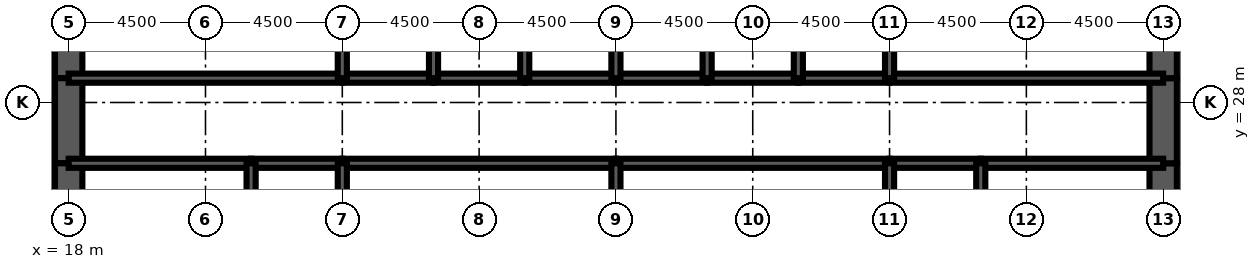
"""IFC4 building model, lengths in metres.
Left out: names, types, materials, properties, quantities, classifications, styles, units other than length and angle.
Written with IfcOpenShell. Run it as: python <this file> out.ifc"""

import sys

from ifc_helpers import new_model, si_unit, direction, frame, frame_2d, origin, place, context, subcontext, project, spatial, rectangle, extrude, element, fill, save


model = new_model("IFC4")
c1 = context("Model", 3, precision=1e-05, world=origin(), true_north=direction((0.0, 1.0)))
c2 = subcontext(c1, "Body", "Model", "MODEL_VIEW")
j1 = project(units=[si_unit("LENGTHUNIT", "METRE"), si_unit("PLANEANGLEUNIT", "RADIAN")], contexts=[c1])
p1 = place(None, origin())
s1 = spatial("IfcSite", under=j1, at=p1, CompositionType="ELEMENT")
p2 = place(p1, origin())
s2 = spatial("IfcBuilding", under=s1, at=p2, CompositionType="ELEMENT")
p3 = place(p2, frame((0.0, 0.0, 41.0)))
s3 = spatial("IfcBuildingStorey", under=s2, at=p3, CompositionType="ELEMENT", Elevation=41.0)
p4 = place(p3, frame((18.0, 32.0, 0.0), z_axis=(0.0, 0.0, 1.0), x_axis=(0.0, -1.0, 0.0)))
e1 = element("IfcWall", 1, at=p4, inside=s3, PredefinedType="SHEAR", context=c2, shape_type="SweptSolid", body=[
    extrude(rectangle(XDim=3.2, YDim=0.9, at=frame_2d((1.6, 0.0))), origin(), (0.0, 0.0, 1.0), 4.5),
])
p5 = place(p3, frame((18.0, 28.8, 0.0), z_axis=(0.0, 0.0, 1.0), x_axis=(0.0, -1.0, 0.0)))
e2 = element("IfcWall", 2, at=p5, inside=s3, PredefinedType="SHEAR", context=c2, shape_type="SweptSolid", body=[
    extrude(rectangle(XDim=2.8, YDim=0.9, at=frame_2d((1.4, 0.0))), origin(), (0.0, 0.0, 1.0), 4.5),
])
p6 = place(p5, frame((0.4, 0.0, 0.0)))
e3 = element("IfcOpeningElement", 3, at=p6, cuts=e2, PredefinedType="OPENING", context=c2, shape_type="SweptSolid", body=[
    extrude(rectangle(XDim=1.8, YDim=2.1, at=frame_2d((0.9, 1.05))), frame((0.0, 0.46, 0.0), z_axis=(0.0, -1.0, 0.0), x_axis=(1.0, 0.0, 0.0)), (0.0, 0.0, 1.0), 0.92),
])
for number, where, z_axis, x_axis in (
    (4, (18.0, 26.0, 0.0), (0.0, 0.0, 1.0), (0.0, -1.0, 0.0)),
    (5, (54.0, 22.0, 0.0), (0.0, 0.0, 1.0), (0.0, 1.0, 0.0)),
):
    element("IfcWall", number, at=place(p3, frame(where, z_axis=z_axis, x_axis=x_axis)), inside=s3, PredefinedType="SHEAR", context=c2, shape_type="SweptSolid", body=[
        extrude(rectangle(XDim=4.0, YDim=0.9, at=frame_2d((2.0, 0.0))), origin(), (0.0, 0.0, 1.0), 4.5),
    ])
p7 = place(p3, frame((54.0, 26.0, 0.0), z_axis=(0.0, 0.0, 1.0), x_axis=(0.0, 1.0, 0.0)))
e6 = element("IfcWall", 6, at=p7, inside=s3, PredefinedType="SHEAR", context=c2, shape_type="SweptSolid", body=[
    extrude(rectangle(XDim=2.8, YDim=0.9, at=frame_2d((1.4, 0.0))), origin(), (0.0, 0.0, 1.0), 4.5),
])
p8 = place(p7, frame((0.6, 0.0, 0.0)))
e7 = element("IfcOpeningElement", 7, at=p8, cuts=e6, PredefinedType="OPENING", context=c2, shape_type="SweptSolid", body=[
    extrude(rectangle(XDim=1.8, YDim=2.1, at=frame_2d((0.9, 1.05))), frame((0.0, 0.46, 0.0), z_axis=(0.0, -1.0, 0.0), x_axis=(1.0, 0.0, 0.0)), (0.0, 0.0, 1.0), 0.92),
])
p9 = place(p3, frame((54.0, 28.8, 0.0), z_axis=(0.0, 0.0, 1.0), x_axis=(0.0, 1.0, 0.0)))
e8 = element("IfcWall", 8, at=p9, inside=s3, PredefinedType="SHEAR", context=c2, shape_type="SweptSolid", body=[
    extrude(rectangle(XDim=3.2, YDim=0.9, at=frame_2d((1.6, 0.0))), origin(), (0.0, 0.0, 1.0), 4.5),
])
p10 = place(p3, frame((18.0, 28.8, 0.0), z_axis=(0.0, 0.0, 1.0), x_axis=(1.0, 0.0, 0.0)))
e9 = element("IfcWall", 9, at=p10, inside=s3, PredefinedType="SOLIDWALL", context=c2, shape_type="SweptSolid", body=[
    extrude(rectangle(XDim=9.0, YDim=0.3, at=frame_2d((4.5, 0.0))), origin(), (0.0, 0.0, 1.0), 4.5),
])
p11 = place(p10, frame((0.65, 0.0, 0.0)))
e10 = element("IfcOpeningElement", 10, at=p11, cuts=e9, PredefinedType="OPENING", context=c2, shape_type="SweptSolid", body=[
    extrude(rectangle(XDim=1.0, YDim=2.1, at=frame_2d((0.5, 1.05))), frame((0.0, 0.16, 0.0), z_axis=(0.0, -1.0, 0.0), x_axis=(1.0, 0.0, 0.0)), (0.0, 0.0, 1.0), 0.32),
])
p12 = place(p3, frame((27.0, 28.8, 0.0), z_axis=(0.0, 0.0, 1.0), x_axis=(1.0, 0.0, 0.0)))
e11 = element("IfcWall", 11, at=p12, inside=s3, PredefinedType="SOLIDWALL", context=c2, shape_type="SweptSolid", body=[
    extrude(rectangle(XDim=3.0, YDim=0.3, at=frame_2d((1.5, 0.0))), origin(), (0.0, 0.0, 1.0), 4.5),
])
p13 = place(p12, frame((0.95, 0.0, 0.0)))
e12 = element("IfcOpeningElement", 12, at=p13, cuts=e11, PredefinedType="OPENING", context=c2, shape_type="SweptSolid", body=[
    extrude(rectangle(XDim=1.1, YDim=2.2, at=frame_2d((0.55, 1.1))), frame((0.0, 0.16, 0.0), z_axis=(0.0, -1.0, 0.0), x_axis=(1.0, 0.0, 0.0)), (0.0, 0.0, 1.0), 0.32),
])
p14 = place(p3, frame((30.0, 28.8, 0.0), z_axis=(0.0, 0.0, 1.0), x_axis=(1.0, 0.0, 0.0)))
e13 = element("IfcWall", 13, at=p14, inside=s3, PredefinedType="SOLIDWALL", context=c2, shape_type="SweptSolid", body=[
    extrude(rectangle(XDim=3.0, YDim=0.3, at=frame_2d((1.5, 0.0))), origin(), (0.0, 0.0, 1.0), 4.5),
])
p15 = place(p14, frame((0.95, 0.0, 0.0)))
e14 = element("IfcOpeningElement", 14, at=p15, cuts=e13, PredefinedType="OPENING", context=c2, shape_type="SweptSolid", body=[
    extrude(rectangle(XDim=1.1, YDim=2.2, at=frame_2d((0.55, 1.1))), frame((0.0, 0.16, 0.0), z_axis=(0.0, -1.0, 0.0), x_axis=(1.0, 0.0, 0.0)), (0.0, 0.0, 1.0), 0.32),
])
p16 = place(p3, frame((33.0, 28.8, 0.0), z_axis=(0.0, 0.0, 1.0), x_axis=(1.0, 0.0, 0.0)))
e15 = element("IfcWall", 15, at=p16, inside=s3, PredefinedType="SOLIDWALL", context=c2, shape_type="SweptSolid", body=[
    extrude(rectangle(XDim=3.0, YDim=0.3, at=frame_2d((1.5, 0.0))), origin(), (0.0, 0.0, 1.0), 4.5),
])
p17 = place(p16, frame((0.95, 0.0, 0.0)))
e16 = element("IfcOpeningElement", 16, at=p17, cuts=e15, PredefinedType="OPENING", context=c2, shape_type="SweptSolid", body=[
    extrude(rectangle(XDim=1.1, YDim=2.2, at=frame_2d((0.55, 1.1))), frame((0.0, 0.16, 0.0), z_axis=(0.0, -1.0, 0.0), x_axis=(1.0, 0.0, 0.0)), (0.0, 0.0, 1.0), 0.32),
])
for number, where, z_axis, x_axis in (
    (17, (36.0, 28.8, 0.0), (0.0, 0.0, 1.0), (1.0, 0.0, 0.0)),
    (18, (39.0, 28.8, 0.0), (0.0, 0.0, 1.0), (1.0, 0.0, 0.0)),
):
    element("IfcWall", number, at=place(p3, frame(where, z_axis=z_axis, x_axis=x_axis)), inside=s3, PredefinedType="SOLIDWALL", context=c2, shape_type="SweptSolid", body=[
        extrude(rectangle(XDim=3.0, YDim=0.3, at=frame_2d((1.5, 0.0))), origin(), (0.0, 0.0, 1.0), 4.5),
    ])
p18 = place(p3, frame((42.0, 28.8, 0.0), z_axis=(0.0, 0.0, 1.0), x_axis=(1.0, 0.0, 0.0)))
e19 = element("IfcWall", 19, at=p18, inside=s3, PredefinedType="SOLIDWALL", context=c2, shape_type="SweptSolid", body=[
    extrude(rectangle(XDim=3.0, YDim=0.3, at=frame_2d((1.5, 0.0))), origin(), (0.0, 0.0, 1.0), 4.5),
])
p19 = place(p18, frame((0.95, 0.0, 0.0)))
e20 = element("IfcOpeningElement", 20, at=p19, cuts=e19, PredefinedType="OPENING", context=c2, shape_type="SweptSolid", body=[
    extrude(rectangle(XDim=1.1, YDim=2.2, at=frame_2d((0.55, 1.1))), frame((0.0, 0.16, 0.0), z_axis=(0.0, -1.0, 0.0), x_axis=(1.0, 0.0, 0.0)), (0.0, 0.0, 1.0), 0.32),
])
p20 = place(p3, frame((45.0, 28.8, 0.0), z_axis=(0.0, 0.0, 1.0), x_axis=(1.0, 0.0, 0.0)))
e21 = element("IfcWall", 21, at=p20, inside=s3, PredefinedType="SOLIDWALL", context=c2, shape_type="SweptSolid", body=[
    extrude(rectangle(XDim=9.0, YDim=0.3, at=frame_2d((4.5, 0.0))), origin(), (0.0, 0.0, 1.0), 4.5),
])
p21 = place(p20, frame((7.35, 0.0, 0.0)))
e22 = element("IfcOpeningElement", 22, at=p21, cuts=e21, PredefinedType="OPENING", context=c2, shape_type="SweptSolid", body=[
    extrude(rectangle(XDim=1.0, YDim=2.1, at=frame_2d((0.5, 1.05))), frame((0.0, 0.16, 0.0), z_axis=(0.0, -1.0, 0.0), x_axis=(1.0, 0.0, 0.0)), (0.0, 0.0, 1.0), 0.32),
])
p22 = place(p3, frame((18.0, 26.0, 0.0), z_axis=(0.0, 0.0, 1.0), x_axis=(1.0, 0.0, 0.0)))
e23 = element("IfcWall", 23, at=p22, inside=s3, PredefinedType="SOLIDWALL", context=c2, shape_type="SweptSolid", body=[
    extrude(rectangle(XDim=6.0, YDim=0.3, at=frame_2d((3.0, 0.0))), origin(), (0.0, 0.0, 1.0), 4.5),
])
p23 = place(p3, frame((24.0, 26.0, 0.0), z_axis=(0.0, 0.0, 1.0), x_axis=(1.0, 0.0, 0.0)))
e24 = element("IfcWall", 24, at=p23, inside=s3, PredefinedType="SOLIDWALL", context=c2, shape_type="SweptSolid", body=[
    extrude(rectangle(XDim=3.0, YDim=0.3, at=frame_2d((1.5, 0.0))), origin(), (0.0, 0.0, 1.0), 4.5),
])
for number, where, z_axis, x_axis in (
    (25, (27.0, 26.0, 0.0), (0.0, 0.0, 1.0), (1.0, 0.0, 0.0)),
    (26, (36.0, 26.0, 0.0), (0.0, 0.0, 1.0), (1.0, 0.0, 0.0)),
):
    element("IfcWall", number, at=place(p3, frame(where, z_axis=z_axis, x_axis=x_axis)), inside=s3, PredefinedType="SOLIDWALL", context=c2, shape_type="SweptSolid", body=[
        extrude(rectangle(XDim=9.0, YDim=0.3, at=frame_2d((4.5, 0.0))), origin(), (0.0, 0.0, 1.0), 4.5),
    ])
p24 = place(p3, frame((45.0, 26.0, 0.0), z_axis=(0.0, 0.0, 1.0), x_axis=(1.0, 0.0, 0.0)))
e27 = element("IfcWall", 27, at=p24, inside=s3, PredefinedType="SOLIDWALL", context=c2, shape_type="SweptSolid", body=[
    extrude(rectangle(XDim=3.0, YDim=0.3, at=frame_2d((1.5, 0.0))), origin(), (0.0, 0.0, 1.0), 4.5),
])
p25 = place(p3, frame((48.0, 26.0, 0.0), z_axis=(0.0, 0.0, 1.0), x_axis=(1.0, 0.0, 0.0)))
e28 = element("IfcWall", 28, at=p25, inside=s3, PredefinedType="SOLIDWALL", context=c2, shape_type="SweptSolid", body=[
    extrude(rectangle(XDim=6.0, YDim=0.3, at=frame_2d((3.0, 0.0))), origin(), (0.0, 0.0, 1.0), 4.5),
])
for number, where, z_axis, x_axis in (
    (29, (27.0, 28.8, 0.0), (0.0, 0.0, 1.0), (0.0, 1.0, 0.0)),
    (30, (30.0, 28.8, 0.0), (0.0, 0.0, 1.0), (0.0, 1.0, 0.0)),
    (31, (33.0, 28.8, 0.0), (0.0, 0.0, 1.0), (0.0, 1.0, 0.0)),
    (32, (36.0, 28.8, 0.0), (0.0, 0.0, 1.0), (0.0, 1.0, 0.0)),
    (33, (39.0, 28.8, 0.0), (0.0, 0.0, 1.0), (0.0, 1.0, 0.0)),
    (34, (42.0, 28.8, 0.0), (0.0, 0.0, 1.0), (0.0, 1.0, 0.0)),
    (35, (45.0, 28.8, 0.0), (0.0, 0.0, 1.0), (0.0, 1.0, 0.0)),
):
    element("IfcWall", number, at=place(p3, frame(where, z_axis=z_axis, x_axis=x_axis)), inside=s3, PredefinedType="SOLIDWALL", context=c2, shape_type="SweptSolid", body=[
        extrude(rectangle(XDim=3.2, YDim=0.3, at=frame_2d((1.6, 0.0))), origin(), (0.0, 0.0, 1.0), 4.5),
    ])
for number, where, z_axis, x_axis in (
    (36, (24.0, 22.0, 0.0), (0.0, 0.0, 1.0), (0.0, 1.0, 0.0)),
    (37, (27.0, 22.0, 0.0), (0.0, 0.0, 1.0), (0.0, 1.0, 0.0)),
    (38, (36.0, 22.0, 0.0), (0.0, 0.0, 1.0), (0.0, 1.0, 0.0)),
    (39, (45.0, 22.0, 0.0), (0.0, 0.0, 1.0), (0.0, 1.0, 0.0)),
    (40, (48.0, 22.0, 0.0), (0.0, 0.0, 1.0), (0.0, 1.0, 0.0)),
):
    element("IfcWall", number, at=place(p3, frame(where, z_axis=z_axis, x_axis=x_axis)), inside=s3, PredefinedType="SOLIDWALL", context=c2, shape_type="SweptSolid", body=[
        extrude(rectangle(XDim=4.0, YDim=0.3, at=frame_2d((2.0, 0.0))), origin(), (0.0, 0.0, 1.0), 4.5),
    ])
p26 = place(p3, frame((42.0, 22.15, 0.0), z_axis=(0.0, 0.0, 1.0), x_axis=(0.0, 1.0, 0.0)))
e41 = element("IfcWall", 41, at=p26, inside=s3, PredefinedType="PARTITIONING", context=c2, shape_type="SweptSolid", body=[
    extrude(rectangle(XDim=3.7, YDim=0.15, at=frame_2d((1.85, 0.0))), origin(), (0.0, 0.0, 1.0), 3.0),
])
p27 = place(p26, frame((2.2, 0.0, 0.0)))
e42 = element("IfcOpeningElement", 42, at=p27, cuts=e41, PredefinedType="OPENING", context=c2, shape_type="SweptSolid", body=[
    extrude(rectangle(XDim=1.0, YDim=2.1, at=frame_2d((0.5, 1.05))), frame((0.0, 0.085, 0.0), z_axis=(0.0, -1.0, 0.0), x_axis=(1.0, 0.0, 0.0)), (0.0, 0.0, 1.0), 0.17),
])
for number, where, z_axis, x_axis in (
    (43, (20.325, 22.15, 0.0), (0.0, 0.0, 1.0), (0.0, 1.0, 0.0)),
    (44, (51.375, 22.15, 0.0), (0.0, 0.0, 1.0), (0.0, 1.0, 0.0)),
):
    element("IfcWall", number, at=place(p3, frame(where, z_axis=z_axis, x_axis=x_axis)), inside=s3, PredefinedType="PARTITIONING", context=c2, shape_type="SweptSolid", body=[
        extrude(rectangle(XDim=3.7, YDim=0.15, at=frame_2d((1.85, 0.0))), origin(), (0.0, 0.0, 1.0), 3.0),
    ])
p28 = place(p27, origin())
e45 = element("IfcDoor", 45, at=p28, inside=s3, OperationType="SINGLE_SWING_RIGHT", PredefinedType="DOOR", context=c2, shape_type="SweptSolid", body=[
    extrude(rectangle(XDim=1.0, YDim=2.1, at=frame_2d((0.5, 1.05))), frame((0.0, 0.025, 0.0), z_axis=(0.0, -1.0, 0.0), x_axis=(1.0, 0.0, 0.0)), (0.0, 0.0, 1.0), 0.05),
])
fill(e42, e45)
p29 = place(p19, origin())
e46 = element("IfcDoor", 46, at=p29, inside=s3, OperationType="DOUBLE_DOOR_SLIDING", PredefinedType="USERDEFINED", context=c2, shape_type="SweptSolid", body=[
    extrude(rectangle(XDim=1.1, YDim=2.2, at=frame_2d((0.55, 1.1))), frame((0.0, 0.025, 0.0), z_axis=(0.0, -1.0, 0.0), x_axis=(1.0, 0.0, 0.0)), (0.0, 0.0, 1.0), 0.05),
])
fill(e20, e46)
p30 = place(p13, origin())
e47 = element("IfcDoor", 47, at=p30, inside=s3, OperationType="DOUBLE_DOOR_SLIDING", PredefinedType="USERDEFINED", context=c2, shape_type="SweptSolid", body=[
    extrude(rectangle(XDim=1.1, YDim=2.2, at=frame_2d((0.55, 1.1))), frame((0.0, 0.025, 0.0), z_axis=(0.0, -1.0, 0.0), x_axis=(1.0, 0.0, 0.0)), (0.0, 0.0, 1.0), 0.05),
])
fill(e12, e47)
p31 = place(p15, origin())
e48 = element("IfcDoor", 48, at=p31, inside=s3, OperationType="DOUBLE_DOOR_SLIDING", PredefinedType="USERDEFINED", context=c2, shape_type="SweptSolid", body=[
    extrude(rectangle(XDim=1.1, YDim=2.2, at=frame_2d((0.55, 1.1))), frame((0.0, 0.025, 0.0), z_axis=(0.0, -1.0, 0.0), x_axis=(1.0, 0.0, 0.0)), (0.0, 0.0, 1.0), 0.05),
])
fill(e14, e48)
p32 = place(p17, origin())
e49 = element("IfcDoor", 49, at=p32, inside=s3, OperationType="DOUBLE_DOOR_SLIDING", PredefinedType="USERDEFINED", context=c2, shape_type="SweptSolid", body=[
    extrude(rectangle(XDim=1.1, YDim=2.2, at=frame_2d((0.55, 1.1))), frame((0.0, 0.025, 0.0), z_axis=(0.0, -1.0, 0.0), x_axis=(1.0, 0.0, 0.0)), (0.0, 0.0, 1.0), 0.05),
])
fill(e16, e49)
p33 = place(p11, origin())
e50 = element("IfcDoor", 50, at=p33, inside=s3, OperationType="SINGLE_SWING_LEFT", PredefinedType="DOOR", context=c2, shape_type="SweptSolid", body=[
    extrude(rectangle(XDim=1.0, YDim=2.1, at=frame_2d((0.5, 1.05))), frame((0.0, 0.025, 0.0), z_axis=(0.0, -1.0, 0.0), x_axis=(1.0, 0.0, 0.0)), (0.0, 0.0, 1.0), 0.05),
])
fill(e10, e50)
p34 = place(p21, origin())
e51 = element("IfcDoor", 51, at=p34, inside=s3, OperationType="SINGLE_SWING_RIGHT", PredefinedType="DOOR", context=c2, shape_type="SweptSolid", body=[
    extrude(rectangle(XDim=1.0, YDim=2.1, at=frame_2d((0.5, 1.05))), frame((0.0, 0.025, 0.0), z_axis=(0.0, -1.0, 0.0), x_axis=(1.0, 0.0, 0.0)), (0.0, 0.0, 1.0), 0.05),
])
fill(e22, e51)
p35 = place(p6, origin())
e52 = element("IfcDoor", 52, at=p35, inside=s3, OperationType="SINGLE_SWING_LEFT", PredefinedType="DOOR", context=c2, shape_type="SweptSolid", body=[
    extrude(rectangle(XDim=1.8, YDim=2.1, at=frame_2d((0.9, 1.05))), frame((0.0, 0.45, 0.0), z_axis=(0.0, -1.0, 0.0), x_axis=(1.0, 0.0, 0.0)), (0.0, 0.0, 1.0), 0.899),
])
fill(e3, e52)
p36 = place(p8, origin())
e53 = element("IfcDoor", 53, at=p36, inside=s3, OperationType="SINGLE_SWING_LEFT", PredefinedType="DOOR", context=c2, shape_type="SweptSolid", body=[
    extrude(rectangle(XDim=1.8, YDim=2.1, at=frame_2d((0.9, 1.05))), frame((0.0, 0.45, 0.0), z_axis=(0.0, -1.0, 0.0), x_axis=(1.0, 0.0, 0.0)), (0.0, 0.0, 1.0), 0.899),
])
fill(e7, e53)
save(model, sys.argv[1])
